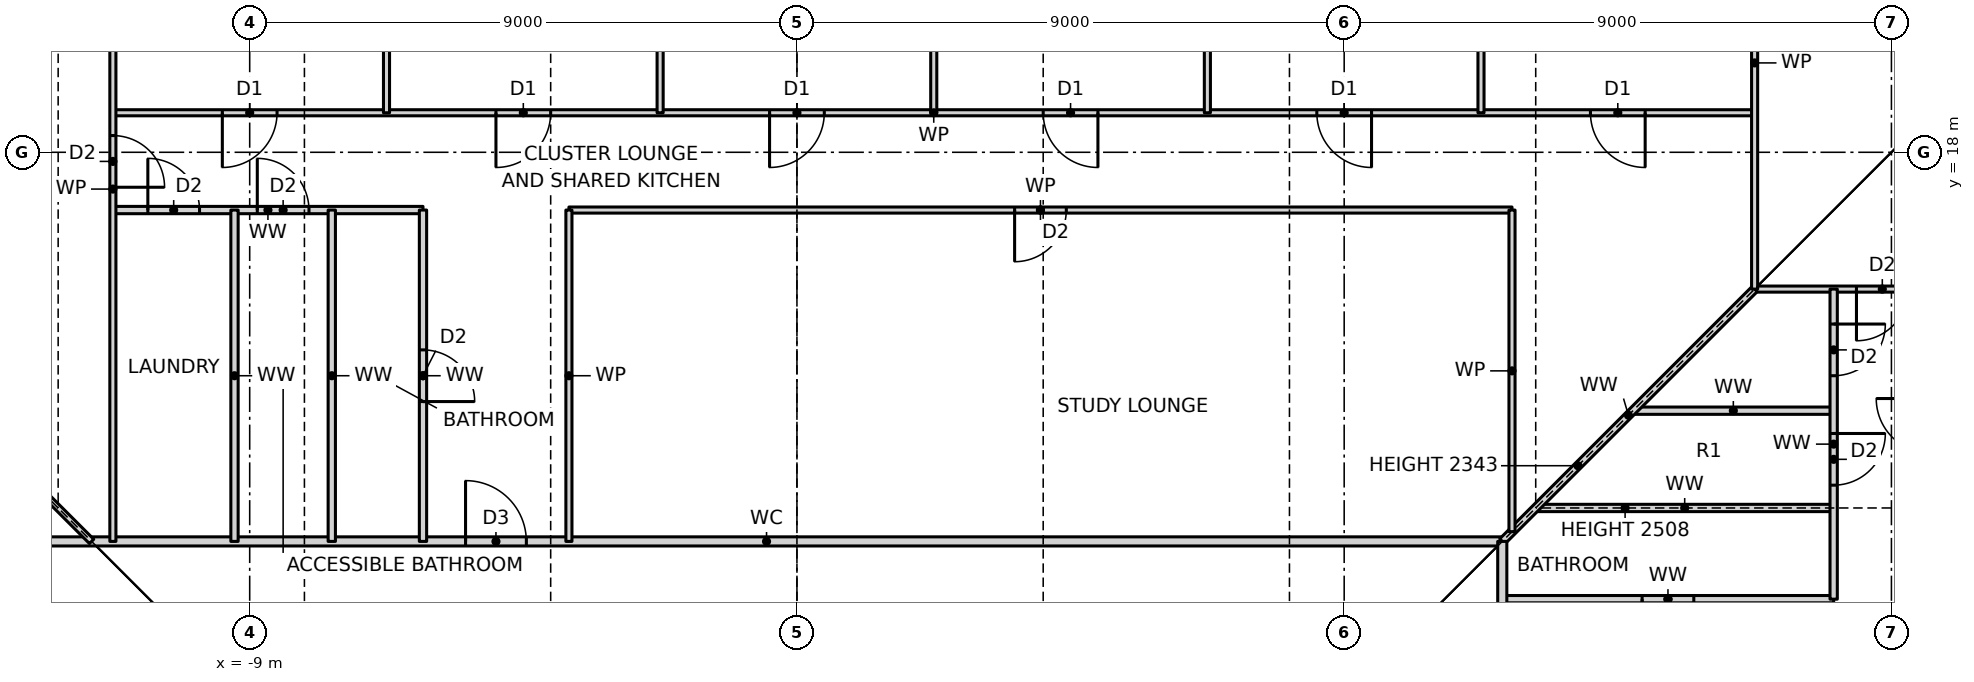
"""IFC4 building model, lengths in metres.
Left out: names, types, materials, properties, quantities, classifications, styles, units other than length and angle.
Written with IfcOpenShell. Run it as: python <this file> out.ifc"""

import sys

from ifc_helpers import new_model, si_unit, direction, frame, frame_2d, origin, place, context, subcontext, project, spatial, rectangle, extrude, element, fill, save


model = new_model("IFC4")
c1 = context("Model", 3, precision=1e-05, world=origin(), true_north=direction((0.0, 1.0)))
c2 = subcontext(c1, "Body", "Model", "MODEL_VIEW")
j1 = project(units=[si_unit("LENGTHUNIT", "METRE"), si_unit("PLANEANGLEUNIT", "RADIAN")], contexts=[c1])
p1 = place(None, origin())
s1 = spatial("IfcSite", under=j1, at=p1, CompositionType="ELEMENT")
p2 = place(p1, origin())
s2 = spatial("IfcBuilding", under=s1, at=p2, CompositionType="ELEMENT")
p3 = place(p2, frame((0.0, 0.0, 46.5)))
s3 = spatial("IfcBuildingStorey", under=s2, at=p3, CompositionType="ELEMENT", Elevation=46.5)
p4 = place(p3, frame((11.6, 10.65, 0.0), z_axis=(0.0, 0.0, 1.0), x_axis=(1.0, 0.0, 0.0)))
e1 = element("IfcWall", 1, at=p4, inside=s3, PredefinedType="PARTITIONING", context=c2, shape_type="SweptSolid", body=[
    extrude(rectangle(XDim=5.45, YDim=0.12, at=frame_2d((2.725, 0.0))), origin(), (0.0, 0.0, 1.0), 3.27),
])
p5 = place(p4, frame((2.3, 0.0, 0.0)))
e2 = element("IfcOpeningElement", 2, at=p5, cuts=e1, PredefinedType="OPENING", context=c2, shape_type="SweptSolid", body=[
    extrude(rectangle(XDim=0.85, YDim=2.1, at=frame_2d((0.425, 1.05))), frame((0.0, 0.07, 0.0), z_axis=(0.0, -1.0, 0.0), x_axis=(1.0, 0.0, 0.0)), (0.0, 0.0, 1.0), 0.14),
])
p6 = place(p3, frame((-12.6, 11.6, 0.0), z_axis=(0.0, 0.0, 1.0), x_axis=(1.0, 0.0, 0.0)))
e3 = element("IfcWall", 3, at=p6, inside=s3, PredefinedType="PARTITIONING", context=c2, shape_type="SweptSolid", body=[
    extrude(rectangle(XDim=24.2, YDim=0.15, at=frame_2d((12.1, 0.0))), origin(), (0.0, 0.0, 1.0), 3.27),
])
p7 = place(p6, frame((7.15, 0.0, 0.0)))
e4 = element("IfcOpeningElement", 4, at=p7, cuts=e3, PredefinedType="OPENING", context=c2, shape_type="SweptSolid", body=[
    extrude(rectangle(XDim=1.0, YDim=2.1, at=frame_2d((0.5, 1.05))), frame((0.0, 0.085, 0.0), z_axis=(0.0, -1.0, 0.0), x_axis=(1.0, 0.0, 0.0)), (0.0, 0.0, 1.0), 0.17),
])
p8 = place(p3, frame((12.15, 12.15, 0.0), z_axis=(0.0, 0.0, 1.0), x_axis=(1.0, 0.0, 0.0)))
e5 = element("IfcWall", 5, at=p8, inside=s3, PredefinedType="PARTITIONING", context=c2, shape_type="SweptSolid", body=[
    extrude(rectangle(XDim=4.9, YDim=0.12, at=frame_2d((2.45, 0.0))), origin(), (0.0, 0.0, 1.0), 2.508),
])
p9 = place(p3, frame((13.75, 13.75, 0.0), z_axis=(0.0, 0.0, 1.0), x_axis=(1.0, 0.0, 0.0)))
e6 = element("IfcWall", 6, at=p9, inside=s3, PredefinedType="PARTITIONING", context=c2, shape_type="SweptSolid", body=[
    extrude(rectangle(XDim=3.3, YDim=0.12, at=frame_2d((1.65, 0.0))), origin(), (0.0, 0.0, 1.0), 3.27),
])
p10 = place(p3, frame((15.75, 15.75, 0.0), z_axis=(0.0, 0.0, 1.0), x_axis=(1.0, 0.0, 0.0)))
e7 = element("IfcWall", 7, at=p10, inside=s3, PredefinedType="PARTITIONING", context=c2, shape_type="SweptSolid", body=[
    extrude(rectangle(XDim=7.44, YDim=0.1, at=frame_2d((3.72, 0.0))), origin(), (0.0, 0.0, 1.0), 3.27),
])
p11 = place(p10, frame((1.675, 0.0, 0.0)))
e8 = element("IfcOpeningElement", 8, at=p11, cuts=e7, PredefinedType="OPENING", context=c2, shape_type="SweptSolid", body=[
    extrude(rectangle(XDim=0.85, YDim=2.1, at=frame_2d((0.425, 1.05))), frame((0.0, 0.06, 0.0), z_axis=(0.0, -1.0, 0.0), x_axis=(1.0, 0.0, 0.0)), (0.0, 0.0, 1.0), 0.12),
])
p12 = place(p3, frame((-11.25, 17.05, 0.0), z_axis=(0.0, 0.0, 1.0), x_axis=(1.0, 0.0, 0.0)))
e9 = element("IfcWall", 9, at=p12, inside=s3, PredefinedType="PARTITIONING", context=c2, shape_type="SweptSolid", body=[
    extrude(rectangle(XDim=5.1, YDim=0.12, at=frame_2d((2.55, 0.0))), origin(), (0.0, 0.0, 1.0), 3.27),
])
p13 = place(p12, frame((2.375, 0.0, 0.0)))
e10 = element("IfcOpeningElement", 10, at=p13, cuts=e9, PredefinedType="OPENING", context=c2, shape_type="SweptSolid", body=[
    extrude(rectangle(XDim=0.85, YDim=2.1, at=frame_2d((0.425, 1.05))), frame((0.0, 0.07, 0.0), z_axis=(0.0, -1.0, 0.0), x_axis=(1.0, 0.0, 0.0)), (0.0, 0.0, 1.0), 0.14),
])
p14 = place(p12, frame((0.575, 0.0, 0.0)))
e11 = element("IfcOpeningElement", 11, at=p14, cuts=e9, PredefinedType="OPENING", context=c2, shape_type="SweptSolid", body=[
    extrude(rectangle(XDim=0.85, YDim=2.1, at=frame_2d((0.425, 1.05))), frame((0.0, 0.07, 0.0), z_axis=(0.0, -1.0, 0.0), x_axis=(1.0, 0.0, 0.0)), (0.0, 0.0, 1.0), 0.14),
])
p15 = place(p3, frame((-3.75, 17.05, 0.0), z_axis=(0.0, 0.0, 1.0), x_axis=(1.0, 0.0, 0.0)))
e12 = element("IfcWall", 12, at=p15, inside=s3, PredefinedType="PARTITIONING", context=c2, shape_type="SweptSolid", body=[
    extrude(rectangle(XDim=15.51, YDim=0.1, at=frame_2d((7.755, 0.0))), origin(), (0.0, 0.0, 1.0), 3.27),
])
p16 = place(p15, frame((7.33, 0.0, 0.0)))
e13 = element("IfcOpeningElement", 13, at=p16, cuts=e12, PredefinedType="OPENING", context=c2, shape_type="SweptSolid", body=[
    extrude(rectangle(XDim=0.85, YDim=2.1, at=frame_2d((0.425, 1.05))), frame((0.0, 0.06, 0.0), z_axis=(0.0, -1.0, 0.0), x_axis=(1.0, 0.0, 0.0)), (0.0, 0.0, 1.0), 0.12),
])
p17 = place(p3, frame((-11.25, 18.65, 0.0), z_axis=(0.0, 0.0, 1.0), x_axis=(1.0, 0.0, 0.0)))
e14 = element("IfcWall", 14, at=p17, inside=s3, PredefinedType="PARTITIONING", context=c2, shape_type="SweptSolid", body=[
    extrude(rectangle(XDim=27.0, YDim=0.1, at=frame_2d((13.5, 0.0))), origin(), (0.0, 0.0, 1.0), 3.27),
])
p18 = place(p17, frame((24.3, 0.0, 0.0)))
e15 = element("IfcOpeningElement", 15, at=p18, cuts=e14, PredefinedType="OPENING", context=c2, shape_type="SweptSolid", body=[
    extrude(rectangle(XDim=0.9, YDim=2.1, at=frame_2d((0.45, 1.05))), frame((0.0, 0.06, 0.0), z_axis=(0.0, -1.0, 0.0), x_axis=(1.0, 0.0, 0.0)), (0.0, 0.0, 1.0), 0.12),
])
p19 = place(p17, frame((19.8, 0.0, 0.0)))
e16 = element("IfcOpeningElement", 16, at=p19, cuts=e14, PredefinedType="OPENING", context=c2, shape_type="SweptSolid", body=[
    extrude(rectangle(XDim=0.9, YDim=2.1, at=frame_2d((0.45, 1.05))), frame((0.0, 0.06, 0.0), z_axis=(0.0, -1.0, 0.0), x_axis=(1.0, 0.0, 0.0)), (0.0, 0.0, 1.0), 0.12),
])
p20 = place(p17, frame((15.3, 0.0, 0.0)))
e17 = element("IfcOpeningElement", 17, at=p20, cuts=e14, PredefinedType="OPENING", context=c2, shape_type="SweptSolid", body=[
    extrude(rectangle(XDim=0.9, YDim=2.1, at=frame_2d((0.45, 1.05))), frame((0.0, 0.06, 0.0), z_axis=(0.0, -1.0, 0.0), x_axis=(1.0, 0.0, 0.0)), (0.0, 0.0, 1.0), 0.12),
])
p21 = place(p17, frame((10.8, 0.0, 0.0)))
e18 = element("IfcOpeningElement", 18, at=p21, cuts=e14, PredefinedType="OPENING", context=c2, shape_type="SweptSolid", body=[
    extrude(rectangle(XDim=0.9, YDim=2.1, at=frame_2d((0.45, 1.05))), frame((0.0, 0.06, 0.0), z_axis=(0.0, -1.0, 0.0), x_axis=(1.0, 0.0, 0.0)), (0.0, 0.0, 1.0), 0.12),
])
p22 = place(p17, frame((6.3, 0.0, 0.0)))
e19 = element("IfcOpeningElement", 19, at=p22, cuts=e14, PredefinedType="OPENING", context=c2, shape_type="SweptSolid", body=[
    extrude(rectangle(XDim=0.9, YDim=2.1, at=frame_2d((0.45, 1.05))), frame((0.0, 0.06, 0.0), z_axis=(0.0, -1.0, 0.0), x_axis=(1.0, 0.0, 0.0)), (0.0, 0.0, 1.0), 0.12),
])
p23 = place(p17, frame((1.8, 0.0, 0.0)))
e20 = element("IfcOpeningElement", 20, at=p23, cuts=e14, PredefinedType="OPENING", context=c2, shape_type="SweptSolid", body=[
    extrude(rectangle(XDim=0.9, YDim=2.1, at=frame_2d((0.45, 1.05))), frame((0.0, 0.06, 0.0), z_axis=(0.0, -1.0, 0.0), x_axis=(1.0, 0.0, 0.0)), (0.0, 0.0, 1.0), 0.12),
])
p24 = place(p3, frame((11.6, 11.6, 0.0), z_axis=(0.0, 0.0, 1.0), x_axis=(0.707106781187, 0.707106781187, 0.0)))
e21 = element("IfcWall", 21, at=p24, inside=s3, PredefinedType="PARTITIONING", context=c2, shape_type="SweptSolid", body=[
    extrude(rectangle(XDim=5.869, YDim=0.12, at=frame_2d((2.935, 0.0))), origin(), (0.0, 0.0, 1.0), 2.343),
])
p25 = place(p3, frame((17.05, 10.65, 0.0), z_axis=(0.0, 0.0, 1.0), x_axis=(0.0, 1.0, 0.0)))
e22 = element("IfcWall", 22, at=p25, inside=s3, PredefinedType="PARTITIONING", context=c2, shape_type="SweptSolid", body=[
    extrude(rectangle(XDim=5.1, YDim=0.12, at=frame_2d((2.55, 0.0))), origin(), (0.0, 0.0, 1.0), 3.27),
])
p26 = place(p25, frame((1.875, 0.0, 0.0)))
e23 = element("IfcOpeningElement", 23, at=p26, cuts=e22, PredefinedType="OPENING", context=c2, shape_type="SweptSolid", body=[
    extrude(rectangle(XDim=0.85, YDim=2.1, at=frame_2d((0.425, 1.05))), frame((0.0, 0.07, 0.0), z_axis=(0.0, -1.0, 0.0), x_axis=(1.0, 0.0, 0.0)), (0.0, 0.0, 1.0), 0.14),
])
p27 = place(p25, frame((3.675, 0.0, 0.0)))
e24 = element("IfcOpeningElement", 24, at=p27, cuts=e22, PredefinedType="OPENING", context=c2, shape_type="SweptSolid", body=[
    extrude(rectangle(XDim=0.85, YDim=2.1, at=frame_2d((0.425, 1.05))), frame((0.0, 0.07, 0.0), z_axis=(0.0, -1.0, 0.0), x_axis=(1.0, 0.0, 0.0)), (0.0, 0.0, 1.0), 0.14),
])
p28 = place(p3, frame((15.75, 15.75, 0.0), z_axis=(0.0, 0.0, 1.0), x_axis=(0.0, 1.0, 0.0)))
e25 = element("IfcWall", 25, at=p28, inside=s3, PredefinedType="PARTITIONING", context=c2, shape_type="SweptSolid", body=[
    extrude(rectangle(XDim=7.44, YDim=0.1, at=frame_2d((3.72, 0.0))), origin(), (0.0, 0.0, 1.0), 3.27),
])
p29 = place(p3, frame((11.76, 11.76, 0.0), z_axis=(0.0, 0.0, 1.0), x_axis=(0.0, 1.0, 0.0)))
e26 = element("IfcWall", 26, at=p29, inside=s3, PredefinedType="PARTITIONING", context=c2, shape_type="SweptSolid", body=[
    extrude(rectangle(XDim=5.29, YDim=0.1, at=frame_2d((2.645, 0.0))), origin(), (0.0, 0.0, 1.0), 3.27),
])
p30 = place(p3, frame((11.6, -11.6, 0.0), z_axis=(0.0, 0.0, 1.0), x_axis=(0.0, 1.0, 0.0)))
e27 = element("IfcWall", 27, at=p30, inside=s3, PredefinedType="PARTITIONING", context=c2, shape_type="SweptSolid", body=[
    extrude(rectangle(XDim=23.2, YDim=0.15, at=frame_2d((11.6, 0.0))), origin(), (0.0, 0.0, 1.0), 3.27),
])
p31 = place(p30, frame((20.55, 0.0, 0.0)))
e28 = element("IfcOpeningElement", 28, at=p31, cuts=e27, PredefinedType="OPENING", context=c2, shape_type="SweptSolid", body=[
    extrude(rectangle(XDim=1.0, YDim=2.1, at=frame_2d((0.5, 1.05))), frame((0.0, 0.085, 0.0), z_axis=(0.0, -1.0, 0.0), x_axis=(1.0, 0.0, 0.0)), (0.0, 0.0, 1.0), 0.17),
])
for number, where, z_axis, x_axis in (
    (29, (11.25, 18.65, 0.0), (0.0, 0.0, 1.0), (0.0, 1.0, 0.0)),
    (30, (6.75, 18.65, 0.0), (0.0, 0.0, 1.0), (0.0, 1.0, 0.0)),
    (31, (2.25, 18.65, 0.0), (0.0, 0.0, 1.0), (0.0, 1.0, 0.0)),
    (32, (-2.25, 18.65, 0.0), (0.0, 0.0, 1.0), (0.0, 1.0, 0.0)),
):
    element("IfcWall", number, at=place(p3, frame(where, z_axis=z_axis, x_axis=x_axis)), inside=s3, PredefinedType="PARTITIONING", context=c2, shape_type="SweptSolid", body=[
        extrude(rectangle(XDim=4.54, YDim=0.1, at=frame_2d((2.27, 0.0))), origin(), (0.0, 0.0, 1.0), 3.27),
    ])
p32 = place(p3, frame((-3.75, 11.6, 0.0), z_axis=(0.0, 0.0, 1.0), x_axis=(0.0, 1.0, 0.0)))
e33 = element("IfcWall", 33, at=p32, inside=s3, PredefinedType="PARTITIONING", context=c2, shape_type="SweptSolid", body=[
    extrude(rectangle(XDim=5.45, YDim=0.1, at=frame_2d((2.725, 0.0))), origin(), (0.0, 0.0, 1.0), 3.27),
])
p33 = place(p3, frame((-6.15, 11.6, 0.0), z_axis=(0.0, 0.0, 1.0), x_axis=(0.0, 1.0, 0.0)))
e34 = element("IfcWall", 34, at=p33, inside=s3, PredefinedType="PARTITIONING", context=c2, shape_type="SweptSolid", body=[
    extrude(rectangle(XDim=5.45, YDim=0.12, at=frame_2d((2.725, 0.0))), origin(), (0.0, 0.0, 1.0), 3.27),
])
p34 = place(p33, frame((2.3, 0.0, 0.0)))
e35 = element("IfcOpeningElement", 35, at=p34, cuts=e34, PredefinedType="OPENING", context=c2, shape_type="SweptSolid", body=[
    extrude(rectangle(XDim=0.85, YDim=2.1, at=frame_2d((0.425, 1.05))), frame((0.0, 0.07, 0.0), z_axis=(0.0, -1.0, 0.0), x_axis=(1.0, 0.0, 0.0)), (0.0, 0.0, 1.0), 0.14),
])
p35 = place(p3, frame((-6.75, 18.65, 0.0), z_axis=(0.0, 0.0, 1.0), x_axis=(0.0, 1.0, 0.0)))
e36 = element("IfcWall", 36, at=p35, inside=s3, PredefinedType="PARTITIONING", context=c2, shape_type="SweptSolid", body=[
    extrude(rectangle(XDim=4.54, YDim=0.1, at=frame_2d((2.27, 0.0))), origin(), (0.0, 0.0, 1.0), 3.27),
])
for number, where, z_axis, x_axis in (
    (37, (-7.65, 11.6, 0.0), (0.0, 0.0, 1.0), (0.0, 1.0, 0.0)),
    (38, (-9.25, 11.6, 0.0), (0.0, 0.0, 1.0), (0.0, 1.0, 0.0)),
):
    element("IfcWall", number, at=place(p3, frame(where, z_axis=z_axis, x_axis=x_axis)), inside=s3, PredefinedType="PARTITIONING", context=c2, shape_type="SweptSolid", body=[
        extrude(rectangle(XDim=5.45, YDim=0.12, at=frame_2d((2.725, 0.0))), origin(), (0.0, 0.0, 1.0), 3.27),
    ])
p36 = place(p3, frame((-11.25, 11.6, 0.0), z_axis=(0.0, 0.0, 1.0), x_axis=(0.0, 1.0, 0.0)))
e39 = element("IfcWall", 39, at=p36, inside=s3, PredefinedType="PARTITIONING", context=c2, shape_type="SweptSolid", body=[
    extrude(rectangle(XDim=11.59, YDim=0.1, at=frame_2d((5.795, 0.0))), origin(), (0.0, 0.0, 1.0), 3.27),
])
p37 = place(p36, frame((5.825, 0.0, 0.0)))
e40 = element("IfcOpeningElement", 40, at=p37, cuts=e39, PredefinedType="OPENING", context=c2, shape_type="SweptSolid", body=[
    extrude(rectangle(XDim=0.85, YDim=2.1, at=frame_2d((0.425, 1.05))), frame((0.0, 0.06, 0.0), z_axis=(0.0, -1.0, 0.0), x_axis=(1.0, 0.0, 0.0)), (0.0, 0.0, 1.0), 0.12),
])
p38 = place(p3, frame((-11.6, 11.6, 0.0), z_axis=(0.0, 0.0, 1.0), x_axis=(-0.707106781187, 0.707106781187, 0.0)))
e41 = element("IfcWall", 41, at=p38, inside=s3, PredefinedType="PARTITIONING", context=c2, shape_type="SweptSolid", body=[
    extrude(rectangle(XDim=5.869, YDim=0.1, at=frame_2d((2.935, 0.0))), origin(), (0.0, 0.0, 1.0), 2.343),
])
p39 = place(p5, frame((0.85, 0.0, 0.0), z_axis=(0.0, 0.0, 1.0), x_axis=(-1.0, 0.0, 0.0)))
e42 = element("IfcDoor", 42, at=p39, inside=s3, OperationType="SINGLE_SWING_RIGHT", PredefinedType="DOOR", context=c2, shape_type="SweptSolid", body=[
    extrude(rectangle(XDim=0.85, YDim=2.1, at=frame_2d((0.425, 1.05))), frame((0.0, 0.025, 0.0), z_axis=(0.0, -1.0, 0.0), x_axis=(1.0, 0.0, 0.0)), (0.0, 0.0, 1.0), 0.05),
])
fill(e2, e42)
p40 = place(p26, frame((0.85, 0.0, 0.0), z_axis=(0.0, 0.0, 1.0), x_axis=(-1.0, 0.0, 0.0)))
e43 = element("IfcDoor", 43, at=p40, inside=s3, OperationType="SINGLE_SWING_LEFT", PredefinedType="DOOR", context=c2, shape_type="SweptSolid", body=[
    extrude(rectangle(XDim=0.85, YDim=2.1, at=frame_2d((0.425, 1.05))), frame((0.0, 0.025, 0.0), z_axis=(0.0, -1.0, 0.0), x_axis=(1.0, 0.0, 0.0)), (0.0, 0.0, 1.0), 0.05),
])
fill(e23, e43)
p41 = place(p27, frame((0.85, 0.0, 0.0), z_axis=(0.0, 0.0, 1.0), x_axis=(-1.0, 0.0, 0.0)))
e44 = element("IfcDoor", 44, at=p41, inside=s3, OperationType="SINGLE_SWING_LEFT", PredefinedType="DOOR", context=c2, shape_type="SweptSolid", body=[
    extrude(rectangle(XDim=0.85, YDim=2.1, at=frame_2d((0.425, 1.05))), frame((0.0, 0.025, 0.0), z_axis=(0.0, -1.0, 0.0), x_axis=(1.0, 0.0, 0.0)), (0.0, 0.0, 1.0), 0.05),
])
fill(e24, e44)
p42 = place(p18, frame((0.9, 0.0, 0.0), z_axis=(0.0, 0.0, 1.0), x_axis=(-1.0, 0.0, 0.0)))
e45 = element("IfcDoor", 45, at=p42, inside=s3, OperationType="SINGLE_SWING_LEFT", PredefinedType="DOOR", context=c2, shape_type="SweptSolid", body=[
    extrude(rectangle(XDim=0.9, YDim=2.1, at=frame_2d((0.45, 1.05))), frame((0.0, 0.025, 0.0), z_axis=(0.0, -1.0, 0.0), x_axis=(1.0, 0.0, 0.0)), (0.0, 0.0, 1.0), 0.05),
])
fill(e15, e45)
p43 = place(p19, frame((0.9, 0.0, 0.0), z_axis=(0.0, 0.0, 1.0), x_axis=(-1.0, 0.0, 0.0)))
e46 = element("IfcDoor", 46, at=p43, inside=s3, OperationType="SINGLE_SWING_LEFT", PredefinedType="DOOR", context=c2, shape_type="SweptSolid", body=[
    extrude(rectangle(XDim=0.9, YDim=2.1, at=frame_2d((0.45, 1.05))), frame((0.0, 0.025, 0.0), z_axis=(0.0, -1.0, 0.0), x_axis=(1.0, 0.0, 0.0)), (0.0, 0.0, 1.0), 0.05),
])
fill(e16, e46)
p44 = place(p20, frame((0.9, 0.0, 0.0), z_axis=(0.0, 0.0, 1.0), x_axis=(-1.0, 0.0, 0.0)))
e47 = element("IfcDoor", 47, at=p44, inside=s3, OperationType="SINGLE_SWING_LEFT", PredefinedType="DOOR", context=c2, shape_type="SweptSolid", body=[
    extrude(rectangle(XDim=0.9, YDim=2.1, at=frame_2d((0.45, 1.05))), frame((0.0, 0.025, 0.0), z_axis=(0.0, -1.0, 0.0), x_axis=(1.0, 0.0, 0.0)), (0.0, 0.0, 1.0), 0.05),
])
fill(e17, e47)
p45 = place(p21, frame((0.9, 0.0, 0.0), z_axis=(0.0, 0.0, 1.0), x_axis=(-1.0, 0.0, 0.0)))
e48 = element("IfcDoor", 48, at=p45, inside=s3, OperationType="SINGLE_SWING_RIGHT", PredefinedType="DOOR", context=c2, shape_type="SweptSolid", body=[
    extrude(rectangle(XDim=0.9, YDim=2.1, at=frame_2d((0.45, 1.05))), frame((0.0, 0.025, 0.0), z_axis=(0.0, -1.0, 0.0), x_axis=(1.0, 0.0, 0.0)), (0.0, 0.0, 1.0), 0.05),
])
fill(e18, e48)
p46 = place(p22, frame((0.9, 0.0, 0.0), z_axis=(0.0, 0.0, 1.0), x_axis=(-1.0, 0.0, 0.0)))
e49 = element("IfcDoor", 49, at=p46, inside=s3, OperationType="SINGLE_SWING_RIGHT", PredefinedType="DOOR", context=c2, shape_type="SweptSolid", body=[
    extrude(rectangle(XDim=0.9, YDim=2.1, at=frame_2d((0.45, 1.05))), frame((0.0, 0.025, 0.0), z_axis=(0.0, -1.0, 0.0), x_axis=(1.0, 0.0, 0.0)), (0.0, 0.0, 1.0), 0.05),
])
fill(e19, e49)
p47 = place(p23, frame((0.9, 0.0, 0.0), z_axis=(0.0, 0.0, 1.0), x_axis=(-1.0, 0.0, 0.0)))
e50 = element("IfcDoor", 50, at=p47, inside=s3, OperationType="SINGLE_SWING_RIGHT", PredefinedType="DOOR", context=c2, shape_type="SweptSolid", body=[
    extrude(rectangle(XDim=0.9, YDim=2.1, at=frame_2d((0.45, 1.05))), frame((0.0, 0.025, 0.0), z_axis=(0.0, -1.0, 0.0), x_axis=(1.0, 0.0, 0.0)), (0.0, 0.0, 1.0), 0.05),
])
fill(e20, e50)
p48 = place(p7, origin())
e51 = element("IfcDoor", 51, at=p48, inside=s3, OperationType="SINGLE_SWING_LEFT", PredefinedType="DOOR", context=c2, shape_type="SweptSolid", body=[
    extrude(rectangle(XDim=1.0, YDim=2.1, at=frame_2d((0.5, 1.05))), frame((0.0, 0.025, 0.0), z_axis=(0.0, -1.0, 0.0), x_axis=(1.0, 0.0, 0.0)), (0.0, 0.0, 1.0), 0.05),
])
fill(e4, e51)
p49 = place(p16, frame((0.85, 0.0, 0.0), z_axis=(0.0, 0.0, 1.0), x_axis=(-1.0, 0.0, 0.0)))
e52 = element("IfcDoor", 52, at=p49, inside=s3, OperationType="SINGLE_SWING_RIGHT", PredefinedType="DOOR", context=c2, shape_type="SweptSolid", body=[
    extrude(rectangle(XDim=0.85, YDim=2.1, at=frame_2d((0.425, 1.05))), frame((0.0, 0.025, 0.0), z_axis=(0.0, -1.0, 0.0), x_axis=(1.0, 0.0, 0.0)), (0.0, 0.0, 1.0), 0.05),
])
fill(e13, e52)
p50 = place(p34, frame((0.85, 0.0, 0.0), z_axis=(0.0, 0.0, 1.0), x_axis=(-1.0, 0.0, 0.0)))
e53 = element("IfcDoor", 53, at=p50, inside=s3, OperationType="SINGLE_SWING_RIGHT", PredefinedType="DOOR", context=c2, shape_type="SweptSolid", body=[
    extrude(rectangle(XDim=0.85, YDim=2.1, at=frame_2d((0.425, 1.05))), frame((0.0, 0.025, 0.0), z_axis=(0.0, -1.0, 0.0), x_axis=(1.0, 0.0, 0.0)), (0.0, 0.0, 1.0), 0.05),
])
fill(e35, e53)
p51 = place(p13, origin())
e54 = element("IfcDoor", 54, at=p51, inside=s3, OperationType="SINGLE_SWING_LEFT", PredefinedType="DOOR", context=c2, shape_type="SweptSolid", body=[
    extrude(rectangle(XDim=0.85, YDim=2.1, at=frame_2d((0.425, 1.05))), frame((0.0, 0.025, 0.0), z_axis=(0.0, -1.0, 0.0), x_axis=(1.0, 0.0, 0.0)), (0.0, 0.0, 1.0), 0.05),
])
fill(e10, e54)
p52 = place(p14, origin())
e55 = element("IfcDoor", 55, at=p52, inside=s3, OperationType="SINGLE_SWING_LEFT", PredefinedType="DOOR", context=c2, shape_type="SweptSolid", body=[
    extrude(rectangle(XDim=0.85, YDim=2.1, at=frame_2d((0.425, 1.05))), frame((0.0, 0.025, 0.0), z_axis=(0.0, -1.0, 0.0), x_axis=(1.0, 0.0, 0.0)), (0.0, 0.0, 1.0), 0.05),
])
fill(e11, e55)
p53 = place(p37, frame((0.85, 0.0, 0.0), z_axis=(0.0, 0.0, 1.0), x_axis=(-1.0, 0.0, 0.0)))
e56 = element("IfcDoor", 56, at=p53, inside=s3, OperationType="SINGLE_SWING_RIGHT", PredefinedType="DOOR", context=c2, shape_type="SweptSolid", body=[
    extrude(rectangle(XDim=0.85, YDim=2.1, at=frame_2d((0.425, 1.05))), frame((0.0, 0.025, 0.0), z_axis=(0.0, -1.0, 0.0), x_axis=(1.0, 0.0, 0.0)), (0.0, 0.0, 1.0), 0.05),
])
fill(e40, e56)
p54 = place(p11, frame((0.85, 0.0, 0.0), z_axis=(0.0, 0.0, 1.0), x_axis=(-1.0, 0.0, 0.0)))
e57 = element("IfcDoor", 57, at=p54, inside=s3, OperationType="SINGLE_SWING_RIGHT", PredefinedType="DOOR", context=c2, shape_type="SweptSolid", body=[
    extrude(rectangle(XDim=0.85, YDim=2.1, at=frame_2d((0.425, 1.05))), frame((0.0, 0.025, 0.0), z_axis=(0.0, -1.0, 0.0), x_axis=(1.0, 0.0, 0.0)), (0.0, 0.0, 1.0), 0.05),
])
fill(e8, e57)
save(model, sys.argv[1])
